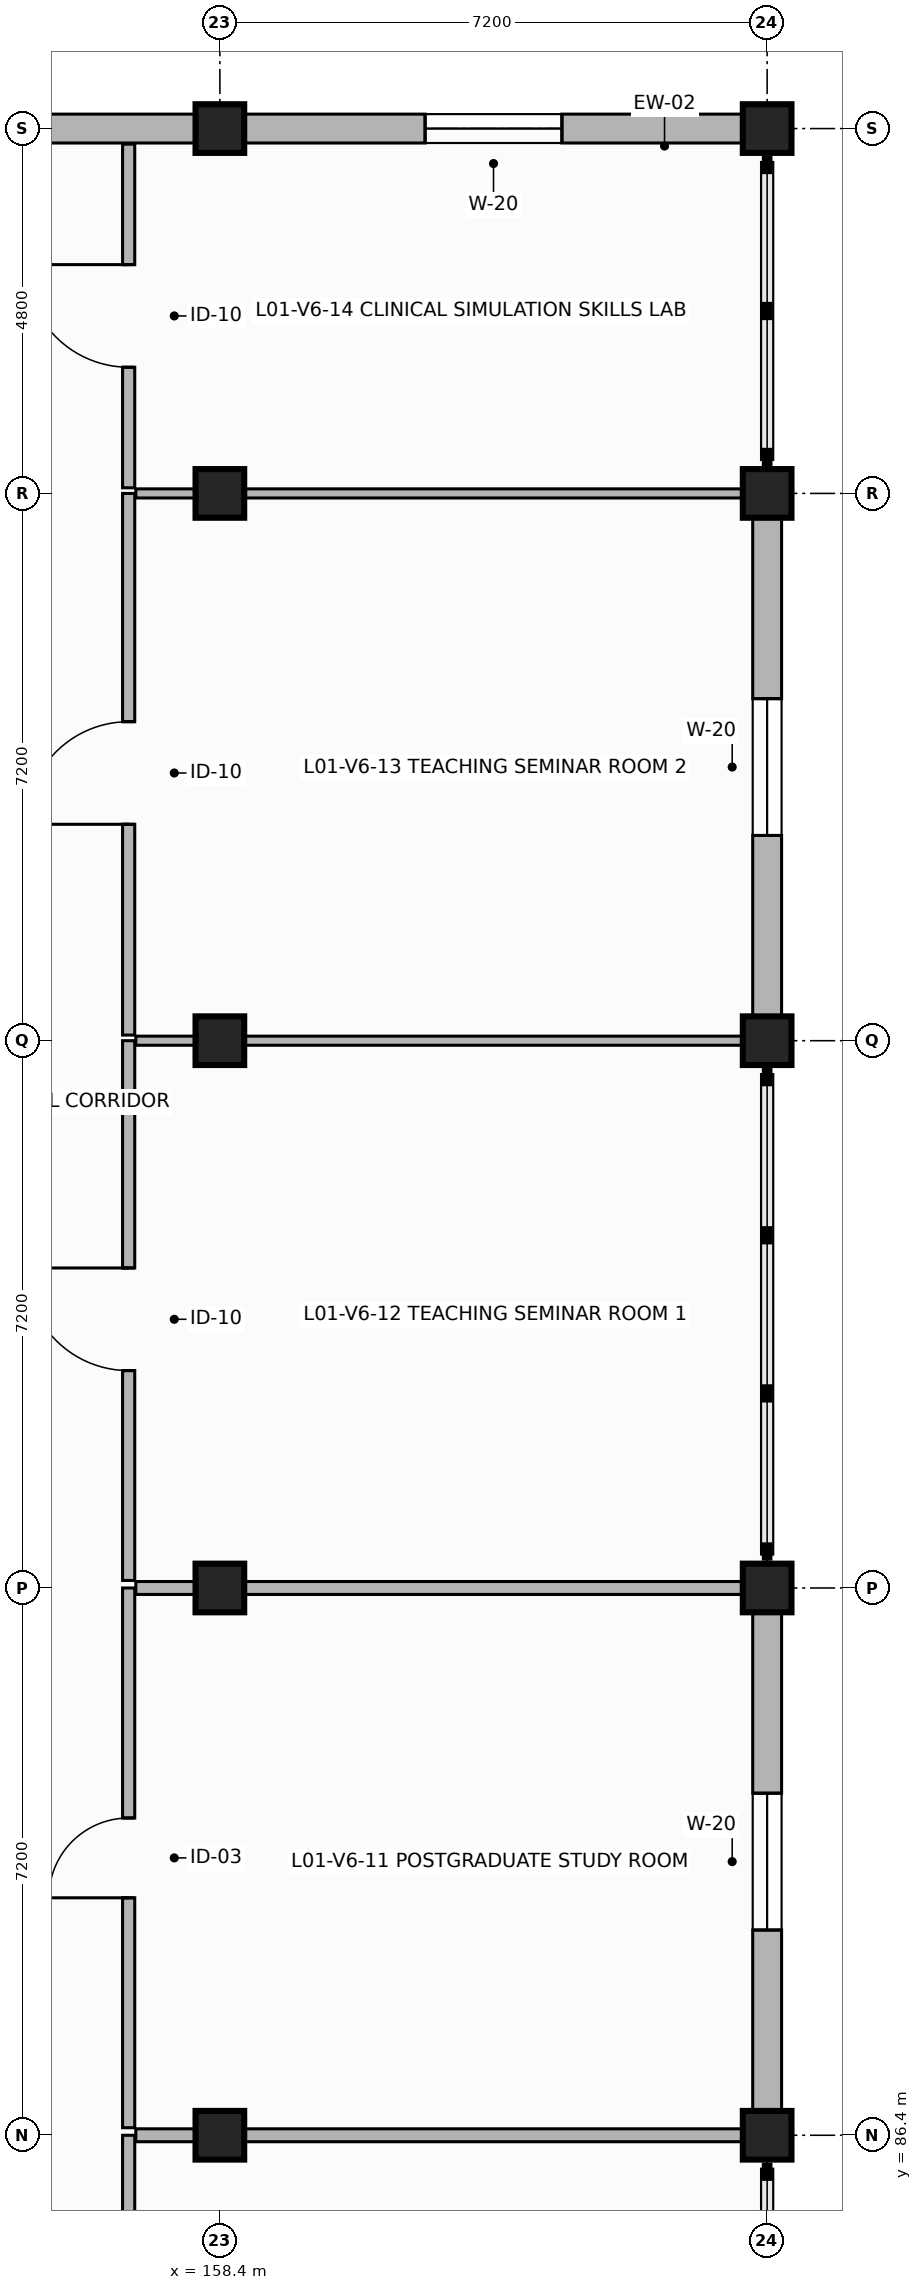
"""IFC4 building model, lengths in metres.
Left out: names, types, materials, properties, quantities, classifications, styles, units other than length and angle.
Written with IfcOpenShell. Run it as: python <this file> out.ifc"""

import sys

from ifc_helpers import new_model, si_unit, direction, frame, frame_2d, origin, origin_2d, place, context, subcontext, project, spatial, rectangle, extrude, element, fill, save


model = new_model("IFC4")
c1 = context("Model", 3, precision=1e-05, world=origin(), true_north=direction((0.0, 1.0)))
c2 = subcontext(c1, "Body", "Model", "MODEL_VIEW")
j1 = project(units=[si_unit("LENGTHUNIT", "METRE"), si_unit("PLANEANGLEUNIT", "RADIAN")], contexts=[c1])
p1 = place(None, origin())
s1 = spatial("IfcSite", under=j1, at=p1, CompositionType="ELEMENT")
p2 = place(p1, origin())
s2 = spatial("IfcBuilding", under=s1, at=p2, CompositionType="ELEMENT")
p3 = place(p2, frame((0.0, 0.0, 4.5)))
s3 = spatial("IfcBuildingStorey", under=s2, at=p3, CompositionType="ELEMENT", Elevation=4.5)
for number, where, z_axis, x_axis in (
    (1, (158.4, 86.4, 0.0), (0.0, 0.0, 1.0), (1.0, 0.0, 0.0)),
    (2, (158.4, 93.6, 0.0), (0.0, 0.0, 1.0), (1.0, 0.0, 0.0)),
    (3, (158.4, 100.8, 0.0), (0.0, 0.0, 1.0), (1.0, 0.0, 0.0)),
    (4, (158.4, 108.0, 0.0), (0.0, 0.0, 1.0), (1.0, 0.0, 0.0)),
    (5, (158.4, 112.8, 0.0), (0.0, 0.0, 1.0), (1.0, 0.0, 0.0)),
    (6, (165.6, 86.4, 0.0), (0.0, 0.0, 1.0), (1.0, 0.0, 0.0)),
    (7, (165.6, 93.6, 0.0), (0.0, 0.0, 1.0), (1.0, 0.0, 0.0)),
    (8, (165.6, 100.8, 0.0), (0.0, 0.0, 1.0), (1.0, 0.0, 0.0)),
    (9, (165.6, 108.0, 0.0), (0.0, 0.0, 1.0), (1.0, 0.0, 0.0)),
    (10, (165.6, 112.8, 0.0), (0.0, 0.0, 1.0), (1.0, 0.0, 0.0)),
):
    element("IfcColumn", number, at=place(p3, frame(where, z_axis=z_axis, x_axis=x_axis)), inside=s3, PredefinedType="COLUMN", context=c2, shape_type="SweptSolid", body=[
        extrude(rectangle(XDim=0.64, YDim=0.64, at=origin_2d()), origin(), (0.0, 0.0, 1.0), 3.58),
    ])
p4 = place(p3, frame((165.6, 86.4, 0.0), z_axis=(0.0, 0.0, 1.0), x_axis=(0.0, 1.0, 0.0)))
e11 = element("IfcWall", 11, at=p4, inside=s3, PredefinedType="SOLIDWALL", context=c2, shape_type="SweptSolid", body=[
    extrude(rectangle(XDim=7.2, YDim=0.38, at=frame_2d((3.6, 0.0))), origin(), (0.0, 0.0, 1.0), 2.91),
])
p5 = place(p4, frame((2.7, 0.0, 0.85)))
e12 = element("IfcOpeningElement", 12, at=p5, cuts=e11, PredefinedType="OPENING", context=c2, shape_type="SweptSolid", body=[
    extrude(rectangle(XDim=1.8, YDim=1.85, at=frame_2d((0.9, 0.925))), frame((0.0, 0.2, 0.0), z_axis=(0.0, -1.0, 0.0), x_axis=(1.0, 0.0, 0.0)), (0.0, 0.0, 1.0), 0.4),
])
p6 = place(p3, frame((165.6, 100.8, 0.0), z_axis=(0.0, 0.0, 1.0), x_axis=(0.0, 1.0, 0.0)))
e13 = element("IfcWall", 13, at=p6, inside=s3, PredefinedType="SOLIDWALL", context=c2, shape_type="SweptSolid", body=[
    extrude(rectangle(XDim=7.2, YDim=0.38, at=frame_2d((3.6, 0.0))), origin(), (0.0, 0.0, 1.0), 2.91),
])
p7 = place(p6, frame((2.7, 0.0, 0.85)))
e14 = element("IfcOpeningElement", 14, at=p7, cuts=e13, PredefinedType="OPENING", context=c2, shape_type="SweptSolid", body=[
    extrude(rectangle(XDim=1.8, YDim=1.85, at=frame_2d((0.9, 0.925))), frame((0.0, 0.2, 0.0), z_axis=(0.0, -1.0, 0.0), x_axis=(1.0, 0.0, 0.0)), (0.0, 0.0, 1.0), 0.4),
])
p8 = place(p3, frame((165.6, 112.8, 0.0), z_axis=(0.0, 0.0, 1.0), x_axis=(-1.0, 0.0, 0.0)))
e15 = element("IfcWall", 15, at=p8, inside=s3, PredefinedType="SOLIDWALL", context=c2, shape_type="SweptSolid", body=[
    extrude(rectangle(XDim=7.2, YDim=0.38, at=frame_2d((3.6, 0.0))), origin(), (0.0, 0.0, 1.0), 2.91),
])
p9 = place(p8, frame((2.7, 0.0, 0.85)))
e16 = element("IfcOpeningElement", 16, at=p9, cuts=e15, PredefinedType="OPENING", context=c2, shape_type="SweptSolid", body=[
    extrude(rectangle(XDim=1.8, YDim=1.85, at=frame_2d((0.9, 0.925))), frame((0.0, 0.2, 0.0), z_axis=(0.0, -1.0, 0.0), x_axis=(1.0, 0.0, 0.0)), (0.0, 0.0, 1.0), 0.4),
])
p10 = place(p3, frame((158.4, 112.8, 0.0), z_axis=(0.0, 0.0, 1.0), x_axis=(-1.0, 0.0, 0.0)))
e17 = element("IfcWall", 17, at=p10, inside=s3, PredefinedType="SOLIDWALL", context=c2, shape_type="SweptSolid", body=[
    extrude(rectangle(XDim=7.2, YDim=0.38, at=frame_2d((3.6, 0.0))), origin(), (0.0, 0.0, 1.0), 2.91),
])
p11 = place(p10, frame((4.7, 0.0, 0.85)))
e18 = element("IfcOpeningElement", 18, at=p11, cuts=e17, PredefinedType="OPENING", context=c2, shape_type="SweptSolid", body=[
    extrude(rectangle(XDim=1.8, YDim=1.85, at=frame_2d((0.9, 0.925))), frame((0.0, 0.2, 0.0), z_axis=(0.0, -1.0, 0.0), x_axis=(1.0, 0.0, 0.0)), (0.0, 0.0, 1.0), 0.4),
])
p12 = place(p3, frame((157.2, 72.099, 0.0), z_axis=(0.0, 0.0, 1.0), x_axis=(0.0, 1.0, 0.0)))
e19 = element("IfcWall", 19, at=p12, inside=s3, PredefinedType="PARTITIONING", context=c2, shape_type="SweptSolid", body=[
    extrude(rectangle(XDim=14.301, YDim=0.16, at=frame_2d((7.15, 0.0))), origin(), (0.0, 0.0, 1.0), 2.89),
])
p13 = place(p12, frame((10.175, 0.0, 0.0)))
e20 = element("IfcOpeningElement", 20, at=p13, cuts=e19, PredefinedType="OPENING", context=c2, shape_type="SweptSolid", body=[
    extrude(rectangle(XDim=0.98, YDim=2.15, at=frame_2d((0.49, 1.075))), frame((0.0, 0.09, 0.0), z_axis=(0.0, -1.0, 0.0), x_axis=(1.0, 0.0, 0.0)), (0.0, 0.0, 1.0), 0.18),
])
p14 = place(p3, frame((157.294, 86.4, 0.0), z_axis=(0.0, 0.0, 1.0), x_axis=(1.0, 0.0, 0.0)))
e21 = element("IfcWall", 21, at=p14, inside=s3, PredefinedType="PARTITIONING", context=c2, shape_type="SweptSolid", body=[
    extrude(rectangle(XDim=8.101, YDim=0.17, at=frame_2d((4.051, 0.0))), origin(), (0.0, 0.0, 1.0), 2.89),
])
p15 = place(p3, frame((157.2, 86.499, 0.0), z_axis=(0.0, 0.0, 1.0), x_axis=(0.0, 1.0, 0.0)))
e22 = element("IfcWall", 22, at=p15, inside=s3, PredefinedType="PARTITIONING", context=c2, shape_type="SweptSolid", body=[
    extrude(rectangle(XDim=7.101, YDim=0.16, at=frame_2d((3.551, 0.0))), origin(), (0.0, 0.0, 1.0), 2.89),
])
p16 = place(p15, frame((3.025, 0.0, 0.0)))
e23 = element("IfcOpeningElement", 23, at=p16, cuts=e22, PredefinedType="OPENING", context=c2, shape_type="SweptSolid", body=[
    extrude(rectangle(XDim=1.05, YDim=2.15, at=frame_2d((0.525, 1.075))), frame((0.0, 0.09, 0.0), z_axis=(0.0, -1.0, 0.0), x_axis=(1.0, 0.0, 0.0)), (0.0, 0.0, 1.0), 0.18),
])
p17 = place(p3, frame((157.294, 93.6, 0.0), z_axis=(0.0, 0.0, 1.0), x_axis=(1.0, 0.0, 0.0)))
e24 = element("IfcWall", 24, at=p17, inside=s3, PredefinedType="PARTITIONING", context=c2, shape_type="SweptSolid", body=[
    extrude(rectangle(XDim=8.101, YDim=0.17, at=frame_2d((4.051, 0.0))), origin(), (0.0, 0.0, 1.0), 2.89),
])
p18 = place(p3, frame((157.2, 93.699, 0.0), z_axis=(0.0, 0.0, 1.0), x_axis=(0.0, 1.0, 0.0)))
e25 = element("IfcWall", 25, at=p18, inside=s3, PredefinedType="PARTITIONING", context=c2, shape_type="SweptSolid", body=[
    extrude(rectangle(XDim=7.101, YDim=0.16, at=frame_2d((3.551, 0.0))), origin(), (0.0, 0.0, 1.0), 2.89),
])
p19 = place(p18, frame((2.761, 0.0, 0.0)))
e26 = element("IfcOpeningElement", 26, at=p19, cuts=e25, PredefinedType="OPENING", context=c2, shape_type="SweptSolid", body=[
    extrude(rectangle(XDim=1.35, YDim=2.25, at=frame_2d((0.675, 1.125))), frame((0.0, 0.09, 0.0), z_axis=(0.0, -1.0, 0.0), x_axis=(1.0, 0.0, 0.0)), (0.0, 0.0, 1.0), 0.18),
])
p20 = place(p3, frame((157.294, 100.8, 0.0), z_axis=(0.0, 0.0, 1.0), x_axis=(1.0, 0.0, 0.0)))
e27 = element("IfcWall", 27, at=p20, inside=s3, PredefinedType="PARTITIONING", context=c2, shape_type="SweptSolid", body=[
    extrude(rectangle(XDim=8.101, YDim=0.12, at=frame_2d((4.051, 0.0))), origin(), (0.0, 0.0, 1.0), 2.89),
])
p21 = place(p3, frame((157.2, 100.874, 0.0), z_axis=(0.0, 0.0, 1.0), x_axis=(0.0, 1.0, 0.0)))
e28 = element("IfcWall", 28, at=p21, inside=s3, PredefinedType="PARTITIONING", context=c2, shape_type="SweptSolid", body=[
    extrude(rectangle(XDim=7.126, YDim=0.16, at=frame_2d((3.563, 0.0))), origin(), (0.0, 0.0, 1.0), 2.89),
])
p22 = place(p21, frame((2.773, 0.0, 0.0)))
e29 = element("IfcOpeningElement", 29, at=p22, cuts=e28, PredefinedType="OPENING", context=c2, shape_type="SweptSolid", body=[
    extrude(rectangle(XDim=1.35, YDim=2.25, at=frame_2d((0.675, 1.125))), frame((0.0, 0.09, 0.0), z_axis=(0.0, -1.0, 0.0), x_axis=(1.0, 0.0, 0.0)), (0.0, 0.0, 1.0), 0.18),
])
p23 = place(p3, frame((157.294, 108.0, 0.0), z_axis=(0.0, 0.0, 1.0), x_axis=(1.0, 0.0, 0.0)))
e30 = element("IfcWall", 30, at=p23, inside=s3, PredefinedType="PARTITIONING", context=c2, shape_type="SweptSolid", body=[
    extrude(rectangle(XDim=8.101, YDim=0.12, at=frame_2d((4.051, 0.0))), origin(), (0.0, 0.0, 1.0), 2.89),
])
p24 = place(p3, frame((157.2, 108.074, 0.0), z_axis=(0.0, 0.0, 1.0), x_axis=(0.0, 1.0, 0.0)))
e31 = element("IfcWall", 31, at=p24, inside=s3, PredefinedType="PARTITIONING", context=c2, shape_type="SweptSolid", body=[
    extrude(rectangle(XDim=4.521, YDim=0.16, at=frame_2d((2.26, 0.0))), origin(), (0.0, 0.0, 1.0), 2.89),
])
p25 = place(p24, frame((1.586, 0.0, 0.0)))
e32 = element("IfcOpeningElement", 32, at=p25, cuts=e31, PredefinedType="OPENING", context=c2, shape_type="SweptSolid", body=[
    extrude(rectangle(XDim=1.35, YDim=2.25, at=frame_2d((0.675, 1.125))), frame((0.0, 0.09, 0.0), z_axis=(0.0, -1.0, 0.0), x_axis=(1.0, 0.0, 0.0)), (0.0, 0.0, 1.0), 0.18),
])
p26 = place(p5, origin())
e33 = element("IfcWindow", 33, at=p26, inside=s3, PartitioningType="SINGLE_PANEL", PredefinedType="WINDOW", context=c2, shape_type="SweptSolid", body=[
    extrude(rectangle(XDim=1.8, YDim=1.85, at=frame_2d((0.9, 0.925))), frame((0.0, 0.03, 0.0), z_axis=(0.0, -1.0, 0.0), x_axis=(1.0, 0.0, 0.0)), (0.0, 0.0, 1.0), 0.06),
])
fill(e12, e33)
p27 = place(p7, origin())
e34 = element("IfcWindow", 34, at=p27, inside=s3, PartitioningType="SINGLE_PANEL", PredefinedType="WINDOW", context=c2, shape_type="SweptSolid", body=[
    extrude(rectangle(XDim=1.8, YDim=1.85, at=frame_2d((0.9, 0.925))), frame((0.0, 0.03, 0.0), z_axis=(0.0, -1.0, 0.0), x_axis=(1.0, 0.0, 0.0)), (0.0, 0.0, 1.0), 0.06),
])
fill(e14, e34)
p28 = place(p9, origin())
e35 = element("IfcWindow", 35, at=p28, inside=s3, PartitioningType="SINGLE_PANEL", PredefinedType="WINDOW", context=c2, shape_type="SweptSolid", body=[
    extrude(rectangle(XDim=1.8, YDim=1.85, at=frame_2d((0.9, 0.925))), frame((0.0, 0.03, 0.0), z_axis=(0.0, -1.0, 0.0), x_axis=(1.0, 0.0, 0.0)), (0.0, 0.0, 1.0), 0.06),
])
fill(e16, e35)
p29 = place(p16, origin())
e36 = element("IfcDoor", 36, at=p29, inside=s3, OperationType="SINGLE_SWING_LEFT", PredefinedType="DOOR", context=c2, shape_type="SweptSolid", body=[
    extrude(rectangle(XDim=1.05, YDim=2.15, at=frame_2d((0.525, 1.075))), frame((0.0, 0.025, 0.0), z_axis=(0.0, -1.0, 0.0), x_axis=(1.0, 0.0, 0.0)), (0.0, 0.0, 1.0), 0.05),
])
fill(e23, e36)
p30 = place(p19, origin())
e37 = element("IfcDoor", 37, at=p30, inside=s3, OperationType="SINGLE_SWING_RIGHT", PredefinedType="DOOR", context=c2, shape_type="SweptSolid", body=[
    extrude(rectangle(XDim=1.35, YDim=2.25, at=frame_2d((0.675, 1.125))), frame((0.0, 0.025, 0.0), z_axis=(0.0, -1.0, 0.0), x_axis=(1.0, 0.0, 0.0)), (0.0, 0.0, 1.0), 0.05),
])
fill(e26, e37)
p31 = place(p22, origin())
e38 = element("IfcDoor", 38, at=p31, inside=s3, OperationType="SINGLE_SWING_LEFT", PredefinedType="DOOR", context=c2, shape_type="SweptSolid", body=[
    extrude(rectangle(XDim=1.35, YDim=2.25, at=frame_2d((0.675, 1.125))), frame((0.0, 0.025, 0.0), z_axis=(0.0, -1.0, 0.0), x_axis=(1.0, 0.0, 0.0)), (0.0, 0.0, 1.0), 0.05),
])
fill(e29, e38)
p32 = place(p25, origin())
e39 = element("IfcDoor", 39, at=p32, inside=s3, OperationType="SINGLE_SWING_RIGHT", PredefinedType="DOOR", context=c2, shape_type="SweptSolid", body=[
    extrude(rectangle(XDim=1.35, YDim=2.25, at=frame_2d((0.675, 1.125))), frame((0.0, 0.025, 0.0), z_axis=(0.0, -1.0, 0.0), x_axis=(1.0, 0.0, 0.0)), (0.0, 0.0, 1.0), 0.05),
])
fill(e32, e39)
save(model, sys.argv[1])
